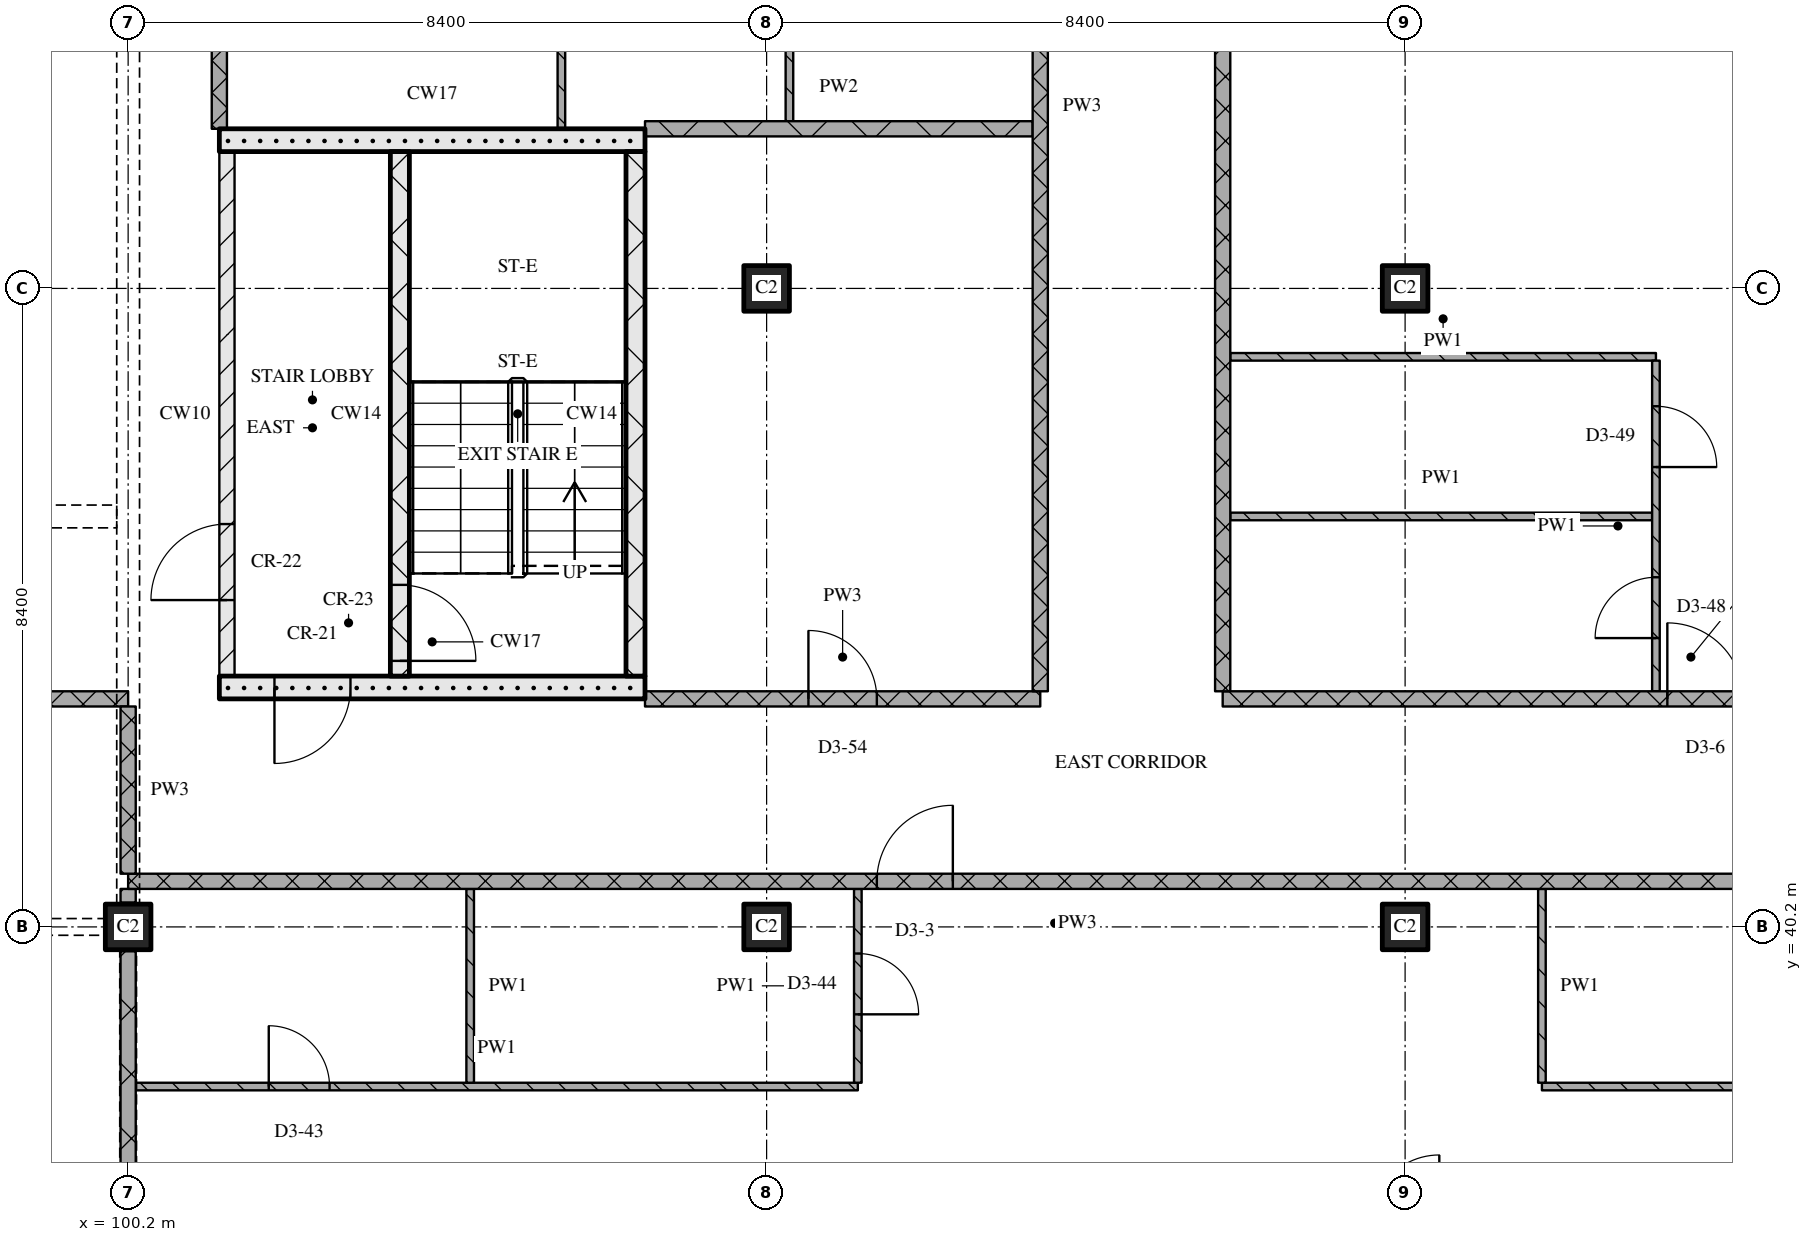
"""IFC4 building model, lengths in metres.
Left out: names, types, materials, properties, quantities, classifications, styles, units other than length and angle.
Written with IfcOpenShell. Run it as: python <this file> out.ifc"""

import sys

from ifc_helpers import new_model, si_unit, direction, frame, frame_2d, origin, origin_2d, place, context, subcontext, project, spatial, rectangle, extrude, element, fill, save


model = new_model("IFC4")
c1 = context("Model", 3, precision=1e-05, world=origin(), true_north=direction((0.0, 1.0)))
c2 = subcontext(c1, "Body", "Model", "MODEL_VIEW")
j1 = project(units=[si_unit("LENGTHUNIT", "METRE"), si_unit("PLANEANGLEUNIT", "RADIAN")], contexts=[c1])
p1 = place(None, origin())
s1 = spatial("IfcSite", under=j1, at=p1, CompositionType="ELEMENT")
p2 = place(p1, origin())
s2 = spatial("IfcBuilding", under=s1, at=p2, CompositionType="ELEMENT")
p3 = place(p2, frame((0.0, 0.0, 230.7)))
s3 = spatial("IfcBuildingStorey", under=s2, at=p3, CompositionType="ELEMENT", Elevation=230.7)
for number, where, z_axis, x_axis in (
    (1, (100.2, 40.2, 0.0), (0.0, 0.0, 1.0), (1.0, 0.0, 0.0)),
    (2, (108.6, 40.2, 0.0), (0.0, 0.0, 1.0), (1.0, 0.0, 0.0)),
    (3, (108.6, 48.6, 0.0), (0.0, 0.0, 1.0), (1.0, 0.0, 0.0)),
    (4, (117.0, 40.2, 0.0), (0.0, 0.0, 1.0), (1.0, 0.0, 0.0)),
    (5, (117.0, 48.6, 0.0), (0.0, 0.0, 1.0), (1.0, 0.0, 0.0)),
):
    element("IfcColumn", number, at=place(p3, frame(where, z_axis=z_axis, x_axis=x_axis)), inside=s3, PredefinedType="COLUMN", context=c2, shape_type="SweptSolid", body=[
        extrude(rectangle(XDim=0.6, YDim=0.6, at=origin_2d()), origin(), (0.0, 0.0, 1.0), 3.6),
    ])
p4 = place(p3, frame((101.4, 43.35, 0.0), z_axis=(0.0, 0.0, 1.0), x_axis=(1.0, 0.0, 0.0)))
e6 = element("IfcWall", 6, at=p4, inside=s3, PredefinedType="SOLIDWALL", context=c2, shape_type="SweptSolid", body=[
    extrude(rectangle(XDim=5.6, YDim=0.3, at=frame_2d((2.8, 0.0))), origin(), (0.0, 0.0, 1.0), 3.32),
])
p5 = place(p4, frame((0.725, 0.0, 0.0)))
e7 = element("IfcOpeningElement", 7, at=p5, cuts=e6, PredefinedType="OPENING", context=c2, shape_type="SweptSolid", body=[
    extrude(rectangle(XDim=1.0, YDim=2.1, at=frame_2d((0.5, 1.05))), frame((0.0, 0.16, 0.0), z_axis=(0.0, -1.0, 0.0), x_axis=(1.0, 0.0, 0.0)), (0.0, 0.0, 1.0), 0.32),
])
p6 = place(p3, frame((101.5, 43.5, 0.0), z_axis=(0.0, 0.0, 1.0), x_axis=(0.0, 1.0, 0.0)))
e8 = element("IfcWall", 8, at=p6, inside=s3, PredefinedType="PARTITIONING", context=c2, shape_type="SweptSolid", body=[
    extrude(rectangle(XDim=6.9, YDim=0.2, at=frame_2d((3.45, 0.0))), origin(), (0.0, 0.0, 1.0), 3.32),
])
p7 = place(p6, frame((1.0, 0.0, 0.0)))
e9 = element("IfcOpeningElement", 9, at=p7, cuts=e8, PredefinedType="OPENING", context=c2, shape_type="SweptSolid", body=[
    extrude(rectangle(XDim=1.0, YDim=2.1, at=frame_2d((0.5, 1.05))), frame((0.0, 0.11, 0.0), z_axis=(0.0, -1.0, 0.0), x_axis=(1.0, 0.0, 0.0)), (0.0, 0.0, 1.0), 0.22),
])
p8 = place(p3, frame((103.775, 43.5, 0.0), z_axis=(0.0, 0.0, 1.0), x_axis=(0.0, 1.0, 0.0)))
e10 = element("IfcWall", 10, at=p8, inside=s3, PredefinedType="SOLIDWALL", context=c2, shape_type="SweptSolid", body=[
    extrude(rectangle(XDim=6.9, YDim=0.25, at=frame_2d((3.45, 0.0))), origin(), (0.0, 0.0, 1.0), 3.32),
])
p9 = place(p8, frame((0.2, 0.0, 0.0)))
e11 = element("IfcOpeningElement", 11, at=p9, cuts=e10, PredefinedType="OPENING", context=c2, shape_type="SweptSolid", body=[
    extrude(rectangle(XDim=1.0, YDim=2.1, at=frame_2d((0.5, 1.05))), frame((0.0, 0.135, 0.0), z_axis=(0.0, -1.0, 0.0), x_axis=(1.0, 0.0, 0.0)), (0.0, 0.0, 1.0), 0.27),
])
p10 = place(p3, frame((106.875, 43.5, 0.0), z_axis=(0.0, 0.0, 1.0), x_axis=(0.0, 1.0, 0.0)))
e12 = element("IfcWall", 12, at=p10, inside=s3, PredefinedType="SOLIDWALL", context=c2, shape_type="SweptSolid", body=[
    extrude(rectangle(XDim=6.9, YDim=0.25, at=frame_2d((3.45, 0.0))), origin(), (0.0, 0.0, 1.0), 3.32),
])
p11 = place(p3, frame((101.4, 50.55, 0.0), z_axis=(0.0, 0.0, 1.0), x_axis=(1.0, 0.0, 0.0)))
e13 = element("IfcWall", 13, at=p11, inside=s3, PredefinedType="SOLIDWALL", context=c2, shape_type="SweptSolid", body=[
    extrude(rectangle(XDim=5.6, YDim=0.3, at=frame_2d((2.8, 0.0))), origin(), (0.0, 0.0, 1.0), 3.32),
])
p12 = place(p3, frame((100.3, 38.1, 0.0), z_axis=(0.0, 0.0, 1.0), x_axis=(1.0, 0.0, 0.0)))
e14 = element("IfcWall", 14, at=p12, inside=s3, PredefinedType="PARTITIONING", context=c2, shape_type="SweptSolid", body=[
    extrude(rectangle(XDim=9.5, YDim=0.1, at=frame_2d((4.75, 0.0))), origin(), (0.0, 0.0, 1.0), 3.32),
])
p13 = place(p12, frame((1.75, 0.0, 0.0)))
e15 = element("IfcOpeningElement", 15, at=p13, cuts=e14, PredefinedType="OPENING", context=c2, shape_type="SweptSolid", body=[
    extrude(rectangle(XDim=0.8, YDim=2.1, at=frame_2d((0.4, 1.05))), frame((0.0, 0.06, 0.0), z_axis=(0.0, -1.0, 0.0), x_axis=(1.0, 0.0, 0.0)), (0.0, 0.0, 1.0), 0.12),
])
p14 = place(p3, frame((118.8, 38.1, 0.0), z_axis=(0.0, 0.0, 1.0), x_axis=(1.0, 0.0, 0.0)))
e16 = element("IfcWall", 16, at=p14, inside=s3, PredefinedType="PARTITIONING", context=c2, shape_type="SweptSolid", body=[
    extrude(rectangle(XDim=8.12, YDim=0.1, at=frame_2d((4.06, 0.0))), origin(), (0.0, 0.0, 1.0), 3.32),
])
p15 = place(p14, frame((3.75, 0.0, 0.0)))
e17 = element("IfcOpeningElement", 17, at=p15, cuts=e16, PredefinedType="OPENING", context=c2, shape_type="SweptSolid", body=[
    extrude(rectangle(XDim=0.9, YDim=2.1, at=frame_2d((0.45, 1.05))), frame((0.0, 0.06, 0.0), z_axis=(0.0, -1.0, 0.0), x_axis=(1.0, 0.0, 0.0)), (0.0, 0.0, 1.0), 0.12),
])
p16 = place(p3, frame((124.58, 40.8, 0.0), z_axis=(0.0, 0.0, 1.0), x_axis=(-1.0, 0.0, 0.0)))
e18 = element("IfcWall", 18, at=p16, inside=s3, PredefinedType="PARTITIONING", context=c2, shape_type="SweptSolid", body=[
    extrude(rectangle(XDim=24.38, YDim=0.2, at=frame_2d((12.19, 0.0))), origin(), (0.0, 0.0, 1.0), 3.32),
])
p17 = place(p16, frame((13.53, 0.0, 0.0)))
e19 = element("IfcOpeningElement", 19, at=p17, cuts=e18, PredefinedType="OPENING", context=c2, shape_type="SweptSolid", body=[
    extrude(rectangle(XDim=1.0, YDim=2.1, at=frame_2d((0.5, 1.05))), frame((0.0, 0.11, 0.0), z_axis=(0.0, -1.0, 0.0), x_axis=(1.0, 0.0, 0.0)), (0.0, 0.0, 1.0), 0.22),
])
p18 = place(p3, frame((100.2, 43.2, 0.0), z_axis=(0.0, 0.0, 1.0), x_axis=(-1.0, 0.0, 0.0)))
e20 = element("IfcWall", 20, at=p18, inside=s3, PredefinedType="PARTITIONING", context=c2, shape_type="SweptSolid", body=[
    extrude(rectangle(XDim=25.2, YDim=0.2, at=frame_2d((12.6, 0.0))), origin(), (0.0, 0.0, 1.0), 3.32),
])
p19 = place(p18, frame((13.45, 0.0, 0.0)))
e21 = element("IfcOpeningElement", 21, at=p19, cuts=e20, PredefinedType="OPENING", context=c2, shape_type="SweptSolid", body=[
    extrude(rectangle(XDim=1.0, YDim=2.1, at=frame_2d((0.5, 1.05))), frame((0.0, 0.11, 0.0), z_axis=(0.0, -1.0, 0.0), x_axis=(1.0, 0.0, 0.0)), (0.0, 0.0, 1.0), 0.22),
])
p20 = place(p3, frame((107.0, 43.2, 0.0), z_axis=(0.0, 0.0, 1.0), x_axis=(1.0, 0.0, 0.0)))
e22 = element("IfcWall", 22, at=p20, inside=s3, PredefinedType="PARTITIONING", context=c2, shape_type="SweptSolid", body=[
    extrude(rectangle(XDim=5.2, YDim=0.2, at=frame_2d((2.6, 0.0))), origin(), (0.0, 0.0, 1.0), 3.32),
])
p21 = place(p20, frame((2.15, 0.0, 0.0)))
e23 = element("IfcOpeningElement", 23, at=p21, cuts=e22, PredefinedType="OPENING", context=c2, shape_type="SweptSolid", body=[
    extrude(rectangle(XDim=0.9, YDim=2.1, at=frame_2d((0.45, 1.05))), frame((0.0, 0.11, 0.0), z_axis=(0.0, -1.0, 0.0), x_axis=(1.0, 0.0, 0.0)), (0.0, 0.0, 1.0), 0.22),
])
p22 = place(p3, frame((114.6, 43.2, 0.0), z_axis=(0.0, 0.0, 1.0), x_axis=(1.0, 0.0, 0.0)))
e24 = element("IfcWall", 24, at=p22, inside=s3, PredefinedType="PARTITIONING", context=c2, shape_type="SweptSolid", body=[
    extrude(rectangle(XDim=12.32, YDim=0.2, at=frame_2d((6.16, 0.0))), origin(), (0.0, 0.0, 1.0), 3.32),
])
p23 = place(p22, frame((5.85, 0.0, 0.0)))
e25 = element("IfcOpeningElement", 25, at=p23, cuts=e24, PredefinedType="OPENING", context=c2, shape_type="SweptSolid", body=[
    extrude(rectangle(XDim=1.0, YDim=2.1, at=frame_2d((0.5, 1.05))), frame((0.0, 0.11, 0.0), z_axis=(0.0, -1.0, 0.0), x_axis=(1.0, 0.0, 0.0)), (0.0, 0.0, 1.0), 0.22),
])
p24 = place(p3, frame((114.7, 45.6, 0.0), z_axis=(0.0, 0.0, 1.0), x_axis=(1.0, 0.0, 0.0)))
e26 = element("IfcWall", 26, at=p24, inside=s3, PredefinedType="PARTITIONING", context=c2, shape_type="SweptSolid", body=[
    extrude(rectangle(XDim=5.55, YDim=0.1, at=frame_2d((2.775, 0.0))), origin(), (0.0, 0.0, 1.0), 3.32),
])
p25 = place(p3, frame((114.7, 47.7, 0.0), z_axis=(0.0, 0.0, 1.0), x_axis=(1.0, 0.0, 0.0)))
e27 = element("IfcWall", 27, at=p25, inside=s3, PredefinedType="PARTITIONING", context=c2, shape_type="SweptSolid", body=[
    extrude(rectangle(XDim=5.6, YDim=0.1, at=frame_2d((2.8, 0.0))), origin(), (0.0, 0.0, 1.0), 3.32),
])
p26 = place(p3, frame((107.0, 50.7, 0.0), z_axis=(0.0, 0.0, 1.0), x_axis=(1.0, 0.0, 0.0)))
e28 = element("IfcWall", 28, at=p26, inside=s3, PredefinedType="PARTITIONING", context=c2, shape_type="SweptSolid", body=[
    extrude(rectangle(XDim=5.1, YDim=0.2, at=frame_2d((2.55, 0.0))), origin(), (0.0, 0.0, 1.0), 3.32),
])
p27 = place(p3, frame((100.2, 43.1, 0.0), z_axis=(0.0, 0.0, 1.0), x_axis=(0.0, -1.0, 0.0)))
e29 = element("IfcWall", 29, at=p27, inside=s3, PredefinedType="PARTITIONING", context=c2, shape_type="SweptSolid", body=[
    extrude(rectangle(XDim=2.2, YDim=0.2, at=frame_2d((1.1, 0.0))), origin(), (0.0, 0.0, 1.0), 2.53),
])
p28 = place(p3, frame((100.2, 39.88, 0.0), z_axis=(0.0, 0.0, 1.0), x_axis=(0.0, -1.0, 0.0)))
e30 = element("IfcWall", 30, at=p28, inside=s3, PredefinedType="PARTITIONING", context=c2, shape_type="SweptSolid", body=[
    extrude(rectangle(XDim=7.76, YDim=0.2, at=frame_2d((3.88, 0.0))), origin(), (0.0, 0.0, 1.0), 2.72),
])
p29 = place(p3, frame((100.2, 40.7, 0.0), z_axis=(0.0, 0.0, 1.0), x_axis=(0.0, -1.0, 0.0)))
e31 = element("IfcWall", 31, at=p29, inside=s3, PredefinedType="PARTITIONING", context=c2, shape_type="SweptSolid", body=[
    extrude(rectangle(XDim=0.18, YDim=0.2, at=frame_2d((0.09, 0.0))), origin(), (0.0, 0.0, 1.0), 3.32),
])
p30 = place(p3, frame((101.4, 58.7, 0.0), z_axis=(0.0, 0.0, 1.0), x_axis=(0.0, -1.0, 0.0)))
e32 = element("IfcWall", 32, at=p30, inside=s3, PredefinedType="PARTITIONING", context=c2, shape_type="SweptSolid", body=[
    extrude(rectangle(XDim=8.0, YDim=0.2, at=frame_2d((4.0, 0.0))), origin(), (0.0, 0.0, 1.0), 3.32),
])
p31 = place(p30, frame((5.225, 0.0, 0.9)))
e33 = element("IfcOpeningElement", 33, at=p31, cuts=e32, PredefinedType="OPENING", context=c2, shape_type="SweptSolid", body=[
    extrude(rectangle(XDim=1.5, YDim=1.5, at=frame_2d((0.75, 0.75))), frame((0.0, 0.11, 0.0), z_axis=(0.0, -1.0, 0.0), x_axis=(1.0, 0.0, 0.0)), (0.0, 0.0, 1.0), 0.22),
])
p32 = place(p3, frame((104.7, 40.7, 0.0), z_axis=(0.0, 0.0, 1.0), x_axis=(0.0, -1.0, 0.0)))
e34 = element("IfcWall", 34, at=p32, inside=s3, PredefinedType="PARTITIONING", context=c2, shape_type="SweptSolid", body=[
    extrude(rectangle(XDim=2.55, YDim=0.1, at=frame_2d((1.275, 0.0))), origin(), (0.0, 0.0, 1.0), 3.32),
])
p33 = place(p3, frame((105.9, 54.7, 0.0), z_axis=(0.0, 0.0, 1.0), x_axis=(0.0, -1.0, 0.0)))
e35 = element("IfcWall", 35, at=p33, inside=s3, PredefinedType="PARTITIONING", context=c2, shape_type="SweptSolid", body=[
    extrude(rectangle(XDim=4.0, YDim=0.1, at=frame_2d((2.0, 0.0))), origin(), (0.0, 0.0, 1.0), 3.32),
])
p34 = place(p3, frame((108.9, 53.65, 0.0), z_axis=(0.0, 0.0, 1.0), x_axis=(0.0, -1.0, 0.0)))
e36 = element("IfcWall", 36, at=p34, inside=s3, PredefinedType="PARTITIONING", context=c2, shape_type="SweptSolid", body=[
    extrude(rectangle(XDim=2.85, YDim=0.1, at=frame_2d((1.425, 0.0))), origin(), (0.0, 0.0, 1.0), 3.32),
])
p35 = place(p3, frame((109.8, 38.15, 0.0), z_axis=(0.0, 0.0, 1.0), x_axis=(0.0, 1.0, 0.0)))
e37 = element("IfcWall", 37, at=p35, inside=s3, PredefinedType="PARTITIONING", context=c2, shape_type="SweptSolid", body=[
    extrude(rectangle(XDim=2.55, YDim=0.1, at=frame_2d((1.275, 0.0))), origin(), (0.0, 0.0, 1.0), 3.32),
])
p36 = place(p35, frame((0.9, 0.0, 0.0)))
e38 = element("IfcOpeningElement", 38, at=p36, cuts=e37, PredefinedType="OPENING", context=c2, shape_type="SweptSolid", body=[
    extrude(rectangle(XDim=0.8, YDim=2.1, at=frame_2d((0.4, 1.05))), frame((0.0, 0.06, 0.0), z_axis=(0.0, -1.0, 0.0), x_axis=(1.0, 0.0, 0.0)), (0.0, 0.0, 1.0), 0.12),
])
p37 = place(p3, frame((112.2, 58.7, 0.0), z_axis=(0.0, 0.0, 1.0), x_axis=(0.0, -1.0, 0.0)))
e39 = element("IfcWall", 39, at=p37, inside=s3, PredefinedType="PARTITIONING", context=c2, shape_type="SweptSolid", body=[
    extrude(rectangle(XDim=15.4, YDim=0.2, at=frame_2d((7.7, 0.0))), origin(), (0.0, 0.0, 1.0), 3.32),
])
p38 = place(p3, frame((114.6, 61.1, 0.0), z_axis=(0.0, 0.0, 1.0), x_axis=(0.0, -1.0, 0.0)))
e40 = element("IfcWall", 40, at=p38, inside=s3, PredefinedType="PARTITIONING", context=c2, shape_type="SweptSolid", body=[
    extrude(rectangle(XDim=17.8, YDim=0.2, at=frame_2d((8.9, 0.0))), origin(), (0.0, 0.0, 1.0), 3.32),
])
p39 = place(p3, frame((118.8, 40.7, 0.0), z_axis=(0.0, 0.0, 1.0), x_axis=(0.0, -1.0, 0.0)))
e41 = element("IfcWall", 41, at=p39, inside=s3, PredefinedType="PARTITIONING", context=c2, shape_type="SweptSolid", body=[
    extrude(rectangle(XDim=2.55, YDim=0.1, at=frame_2d((1.275, 0.0))), origin(), (0.0, 0.0, 1.0), 3.32),
])
p40 = place(p3, frame((120.3, 43.3, 0.0), z_axis=(0.0, 0.0, 1.0), x_axis=(0.0, 1.0, 0.0)))
e42 = element("IfcWall", 42, at=p40, inside=s3, PredefinedType="PARTITIONING", context=c2, shape_type="SweptSolid", body=[
    extrude(rectangle(XDim=4.35, YDim=0.1, at=frame_2d((2.175, 0.0))), origin(), (0.0, 0.0, 1.0), 3.32),
])
p41 = place(p40, frame((0.7, 0.0, 0.0)))
e43 = element("IfcOpeningElement", 43, at=p41, cuts=e42, PredefinedType="OPENING", context=c2, shape_type="SweptSolid", body=[
    extrude(rectangle(XDim=0.8, YDim=2.1, at=frame_2d((0.4, 1.05))), frame((0.0, 0.06, 0.0), z_axis=(0.0, -1.0, 0.0), x_axis=(1.0, 0.0, 0.0)), (0.0, 0.0, 1.0), 0.12),
])
p42 = place(p40, frame((2.95, 0.0, 0.0)))
e44 = element("IfcOpeningElement", 44, at=p42, cuts=e42, PredefinedType="OPENING", context=c2, shape_type="SweptSolid", body=[
    extrude(rectangle(XDim=0.8, YDim=2.1, at=frame_2d((0.4, 1.05))), frame((0.0, 0.06, 0.0), z_axis=(0.0, -1.0, 0.0), x_axis=(1.0, 0.0, 0.0)), (0.0, 0.0, 1.0), 0.12),
])
p43 = place(p5, origin())
e45 = element("IfcDoor", 45, at=p43, inside=s3, OperationType="SINGLE_SWING_RIGHT", PredefinedType="DOOR", context=c2, shape_type="SweptSolid", body=[
    extrude(rectangle(XDim=1.0, YDim=2.1, at=frame_2d((0.5, 1.05))), frame((0.0, 0.025, 0.0), z_axis=(0.0, -1.0, 0.0), x_axis=(1.0, 0.0, 0.0)), (0.0, 0.0, 1.0), 0.05),
])
fill(e7, e45)
p44 = place(p9, origin())
e46 = element("IfcDoor", 46, at=p44, inside=s3, OperationType="SINGLE_SWING_RIGHT", PredefinedType="DOOR", context=c2, shape_type="SweptSolid", body=[
    extrude(rectangle(XDim=1.0, YDim=2.1, at=frame_2d((0.5, 1.05))), frame((0.0, 0.025, 0.0), z_axis=(0.0, -1.0, 0.0), x_axis=(1.0, 0.0, 0.0)), (0.0, 0.0, 1.0), 0.05),
])
fill(e11, e46)
p45 = place(p7, origin())
e47 = element("IfcDoor", 47, at=p45, inside=s3, OperationType="SINGLE_SWING_LEFT", PredefinedType="DOOR", context=c2, shape_type="SweptSolid", body=[
    extrude(rectangle(XDim=1.0, YDim=2.1, at=frame_2d((0.5, 1.05))), frame((0.0, 0.025, 0.0), z_axis=(0.0, -1.0, 0.0), x_axis=(1.0, 0.0, 0.0)), (0.0, 0.0, 1.0), 0.05),
])
fill(e9, e47)
p46 = place(p13, origin())
e48 = element("IfcDoor", 48, at=p46, inside=s3, OperationType="SINGLE_SWING_LEFT", PredefinedType="DOOR", context=c2, shape_type="SweptSolid", body=[
    extrude(rectangle(XDim=0.8, YDim=2.1, at=frame_2d((0.4, 1.05))), frame((0.0, 0.025, 0.0), z_axis=(0.0, -1.0, 0.0), x_axis=(1.0, 0.0, 0.0)), (0.0, 0.0, 1.0), 0.05),
])
fill(e15, e48)
p47 = place(p17, origin())
e49 = element("IfcDoor", 49, at=p47, inside=s3, OperationType="SINGLE_SWING_RIGHT", PredefinedType="DOOR", context=c2, shape_type="SweptSolid", body=[
    extrude(rectangle(XDim=1.0, YDim=2.1, at=frame_2d((0.5, 1.05))), frame((0.0, 0.025, 0.0), z_axis=(0.0, -1.0, 0.0), x_axis=(1.0, 0.0, 0.0)), (0.0, 0.0, 1.0), 0.05),
])
fill(e19, e49)
p48 = place(p21, origin())
e50 = element("IfcDoor", 50, at=p48, inside=s3, OperationType="SINGLE_SWING_LEFT", PredefinedType="DOOR", context=c2, shape_type="SweptSolid", body=[
    extrude(rectangle(XDim=0.9, YDim=2.1, at=frame_2d((0.45, 1.05))), frame((0.0, 0.025, 0.0), z_axis=(0.0, -1.0, 0.0), x_axis=(1.0, 0.0, 0.0)), (0.0, 0.0, 1.0), 0.05),
])
fill(e23, e50)
p49 = place(p23, origin())
e51 = element("IfcDoor", 51, at=p49, inside=s3, OperationType="SINGLE_SWING_LEFT", PredefinedType="DOOR", context=c2, shape_type="SweptSolid", body=[
    extrude(rectangle(XDim=1.0, YDim=2.1, at=frame_2d((0.5, 1.05))), frame((0.0, 0.025, 0.0), z_axis=(0.0, -1.0, 0.0), x_axis=(1.0, 0.0, 0.0)), (0.0, 0.0, 1.0), 0.05),
])
fill(e25, e51)
p50 = place(p36, origin())
e52 = element("IfcDoor", 52, at=p50, inside=s3, OperationType="SINGLE_SWING_RIGHT", PredefinedType="DOOR", context=c2, shape_type="SweptSolid", body=[
    extrude(rectangle(XDim=0.8, YDim=2.1, at=frame_2d((0.4, 1.05))), frame((0.0, 0.025, 0.0), z_axis=(0.0, -1.0, 0.0), x_axis=(1.0, 0.0, 0.0)), (0.0, 0.0, 1.0), 0.05),
])
fill(e38, e52)
p51 = place(p41, origin())
e53 = element("IfcDoor", 53, at=p51, inside=s3, OperationType="SINGLE_SWING_LEFT", PredefinedType="DOOR", context=c2, shape_type="SweptSolid", body=[
    extrude(rectangle(XDim=0.8, YDim=2.1, at=frame_2d((0.4, 1.05))), frame((0.0, 0.025, 0.0), z_axis=(0.0, -1.0, 0.0), x_axis=(1.0, 0.0, 0.0)), (0.0, 0.0, 1.0), 0.05),
])
fill(e43, e53)
p52 = place(p42, origin())
e54 = element("IfcDoor", 54, at=p52, inside=s3, OperationType="SINGLE_SWING_RIGHT", PredefinedType="DOOR", context=c2, shape_type="SweptSolid", body=[
    extrude(rectangle(XDim=0.8, YDim=2.1, at=frame_2d((0.4, 1.05))), frame((0.0, 0.025, 0.0), z_axis=(0.0, -1.0, 0.0), x_axis=(1.0, 0.0, 0.0)), (0.0, 0.0, 1.0), 0.05),
])
fill(e44, e54)
save(model, sys.argv[1])
